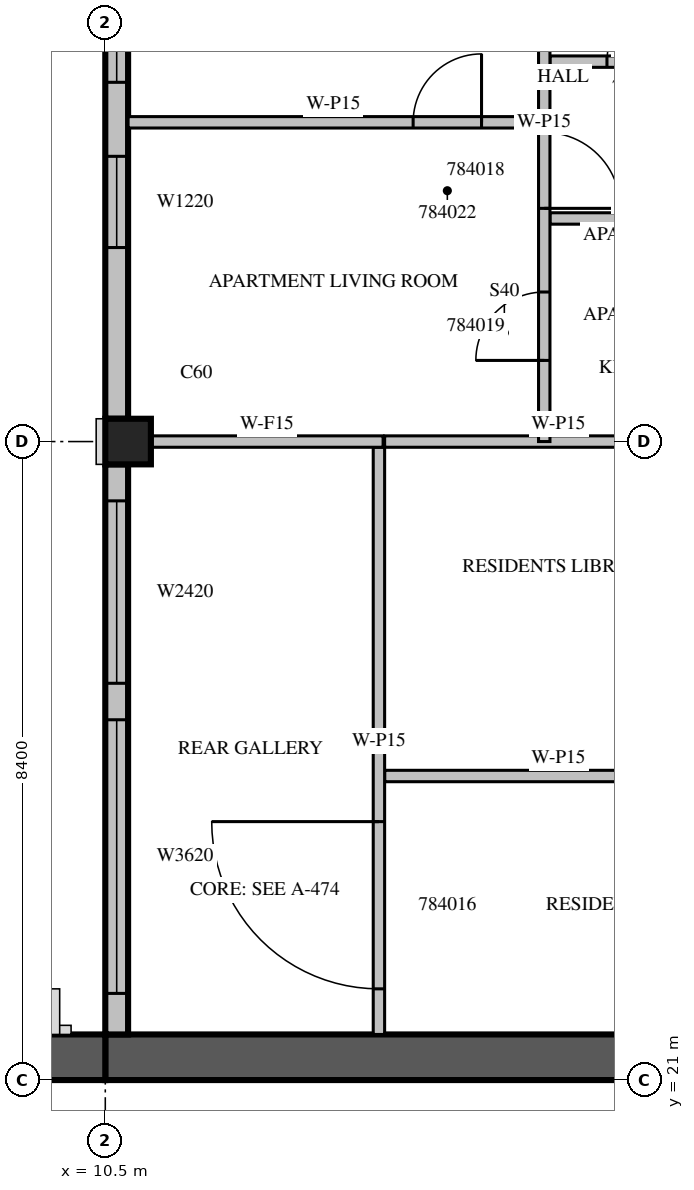
"""IFC4 building model, lengths in metres.
Left out: names, types, materials, properties, quantities, classifications, styles, units other than length and angle.
Written with IfcOpenShell. Run it as: python <this file> out.ifc"""

import sys

from ifc_helpers import new_model, si_unit, direction, frame, frame_2d, origin, origin_2d, place, context, subcontext, project, spatial, rectangle, extrude, source, transform, mapped, element, fill, save


model = new_model("IFC4")
c1 = context("Model", 3, precision=1e-05, world=origin(), true_north=direction((0.0, 1.0)))
c2 = subcontext(c1, "Body", "Model", "MODEL_VIEW")
j1 = project(units=[si_unit("LENGTHUNIT", "METRE"), si_unit("PLANEANGLEUNIT", "RADIAN")], contexts=[c1])
p1 = place(None, origin())
s1 = spatial("IfcSite", under=j1, at=p1, CompositionType="ELEMENT")
p2 = place(p1, origin())
s2 = spatial("IfcBuilding", under=s1, at=p2, CompositionType="ELEMENT")
p3 = place(p2, frame((0.0, 0.0, 354.5)))
s3 = spatial("IfcBuildingStorey", under=s2, at=p3, CompositionType="ELEMENT", Elevation=354.5)
m1 = source(origin(), c2, "Body", "SweptSolid", [
    extrude(rectangle(XDim=0.6, YDim=0.6, at=origin_2d()), origin(), (0.0, 0.0, 1.0), 3.5),
])
p4 = place(p3, frame((10.8, 29.4, 0.0), z_axis=(0.0, 0.0, 1.0), x_axis=(1.0, 0.0, 0.0)))
e1 = element("IfcColumn", 1, at=p4, inside=s3, PredefinedType="COLUMN", context=c2, shape_type="MappedRepresentation", body=[
    mapped(m1, transform((0.0, 0.0, 0.0), scale=1.0)),
])
m2 = source(origin(), c2, "Body", "SweptSolid", [
    extrude(rectangle(XDim=11.1, YDim=0.6, at=frame_2d((5.55, 0.0))), origin(), (0.0, 0.0, 1.0), 3.5),
])
p5 = place(p3, frame((10.5, 21.3, 0.0), z_axis=(0.0, 0.0, 1.0), x_axis=(1.0, 0.0, 0.0)))
e2 = element("IfcWall", 2, at=p5, inside=s3, PredefinedType="SHEAR", context=c2, shape_type="MappedRepresentation", body=[
    mapped(m2, transform((0.0, 0.0, 0.0), scale=1.0)),
])
m3 = source(origin(), c2, "Body", "SweptSolid", [
    extrude(rectangle(XDim=1.2, YDim=2.1, at=frame_2d((0.6, 1.05))), frame((0.0, 0.31, 0.0), z_axis=(0.0, -1.0, 0.0), x_axis=(1.0, 0.0, 0.0)), (0.0, 0.0, 1.0), 0.62),
])
p6 = place(p5, frame((8.7, 0.0, 0.0)))
e3 = element("IfcOpeningElement", 3, at=p6, cuts=e2, PredefinedType="OPENING", context=c2, shape_type="MappedRepresentation", body=[
    mapped(m3, transform((0.0, 0.0, 0.0), scale=1.0)),
])
m4 = source(origin(), c2, "Body", "SweptSolid", [
    extrude(rectangle(XDim=6.6, YDim=0.6, at=frame_2d((3.3, 0.0))), origin(), (0.0, 0.0, 1.0), 3.5),
])
p7 = place(p3, frame((3.9, 21.3, 0.0), z_axis=(0.0, 0.0, 1.0), x_axis=(1.0, 0.0, 0.0)))
e4 = element("IfcWall", 4, at=p7, inside=s3, PredefinedType="SHEAR", context=c2, shape_type="MappedRepresentation", body=[
    mapped(m4, transform((0.0, 0.0, 0.0), scale=1.0)),
])
m5 = source(origin(), c2, "Body", "SweptSolid", [
    extrude(rectangle(XDim=1.2, YDim=2.4, at=frame_2d((0.6, 1.2))), frame((0.0, 0.31, 0.0), z_axis=(0.0, -1.0, 0.0), x_axis=(1.0, 0.0, 0.0)), (0.0, 0.0, 1.0), 0.62),
])
p8 = place(p7, frame((1.5, 0.0, 0.6)))
e5 = element("IfcOpeningElement", 5, at=p8, cuts=e4, PredefinedType="OPENING", context=c2, shape_type="MappedRepresentation", body=[
    mapped(m5, transform((0.0, 0.0, 0.0), scale=1.0)),
])
p9 = place(p7, frame((3.6, 0.0, 0.6)))
e6 = element("IfcOpeningElement", 6, at=p9, cuts=e4, PredefinedType="OPENING", context=c2, shape_type="MappedRepresentation", body=[
    mapped(m5, transform((0.0, 0.0, 0.0), scale=1.0)),
])
m6 = source(origin(), c2, "Body", "SweptSolid", [
    extrude(rectangle(XDim=7.8, YDim=0.3, at=frame_2d((3.9, 0.0))), origin(), (0.0, 0.0, 1.0), 3.1),
])
p10 = place(p3, frame((10.65, 37.5, 0.0), z_axis=(0.0, 0.0, 1.0), x_axis=(0.0, -1.0, 0.0)))
e7 = element("IfcWall", 7, at=p10, inside=s3, PredefinedType="STANDARD", context=c2, shape_type="MappedRepresentation", body=[
    mapped(m6, transform((0.0, 0.0, 0.0), scale=1.0)),
])
m7 = source(origin(), c2, "Body", "SweptSolid", [
    extrude(rectangle(XDim=1.2, YDim=2.0, at=frame_2d((0.6, 1.0))), frame((0.0, 0.16, 0.0), z_axis=(0.0, -1.0, 0.0), x_axis=(1.0, 0.0, 0.0)), (0.0, 0.0, 1.0), 0.32),
])
p11 = place(p10, frame((4.348, 0.0, 0.6)))
e8 = element("IfcOpeningElement", 8, at=p11, cuts=e7, PredefinedType="OPENING", context=c2, shape_type="MappedRepresentation", body=[
    mapped(m7, transform((0.0, 0.0, 0.0), scale=1.0)),
])
m8 = source(origin(), c2, "Body", "SweptSolid", [
    extrude(rectangle(XDim=2.4, YDim=2.0, at=frame_2d((1.2, 1.0))), frame((0.0, 0.16, 0.0), z_axis=(0.0, -1.0, 0.0), x_axis=(1.0, 0.0, 0.0)), (0.0, 0.0, 1.0), 0.32),
])
p12 = place(p10, frame((0.974, 0.0, 0.6)))
e9 = element("IfcOpeningElement", 9, at=p12, cuts=e7, PredefinedType="OPENING", context=c2, shape_type="MappedRepresentation", body=[
    mapped(m8, transform((0.0, 0.0, 0.0), scale=1.0)),
])
m9 = source(origin(), c2, "Body", "SweptSolid", [
    extrude(rectangle(XDim=7.5, YDim=0.3, at=frame_2d((3.75, 0.0))), origin(), (0.0, 0.0, 1.0), 3.1),
])
p13 = place(p3, frame((10.65, 29.1, 0.0), z_axis=(0.0, 0.0, 1.0), x_axis=(0.0, -1.0, 0.0)))
e10 = element("IfcWall", 10, at=p13, inside=s3, PredefinedType="STANDARD", context=c2, shape_type="MappedRepresentation", body=[
    mapped(m9, transform((0.0, 0.0, 0.0), scale=1.0)),
])
m10 = source(origin(), c2, "Body", "SweptSolid", [
    extrude(rectangle(XDim=3.6, YDim=2.0, at=frame_2d((1.8, 1.0))), frame((0.0, 0.16, 0.0), z_axis=(0.0, -1.0, 0.0), x_axis=(1.0, 0.0, 0.0)), (0.0, 0.0, 1.0), 0.32),
])
p14 = place(p13, frame((3.36, 0.0, 0.6)))
e11 = element("IfcOpeningElement", 11, at=p14, cuts=e10, PredefinedType="OPENING", context=c2, shape_type="MappedRepresentation", body=[
    mapped(m10, transform((0.0, 0.0, 0.0), scale=1.0)),
])
p15 = place(p13, frame((0.48, 0.0, 0.6)))
e12 = element("IfcOpeningElement", 12, at=p15, cuts=e10, PredefinedType="OPENING", context=c2, shape_type="MappedRepresentation", body=[
    mapped(m8, transform((0.0, 0.0, 0.0), scale=1.0)),
])
m11 = source(origin(), c2, "Body", "SweptSolid", [
    extrude(rectangle(XDim=4.575, YDim=0.15, at=frame_2d((2.288, 0.0))), origin(), (0.0, 0.0, 1.0), 3.1),
])
for number, where, z_axis, x_axis in (
    (13, (14.175, 25.0, 0.0), (0.0, 0.0, 1.0), (1.0, 0.0, 0.0)),
    (14, (18.75, 29.4, 0.0), (0.0, 0.0, 1.0), (-1.0, 0.0, 0.0)),
):
    element("IfcWall", number, at=place(p3, frame(where, z_axis=z_axis, x_axis=x_axis)), inside=s3, PredefinedType="PARTITIONING", context=c2, shape_type="MappedRepresentation", body=[
        mapped(m11, transform((0.0, 0.0, 0.0), scale=1.0)),
    ])
m12 = source(origin(), c2, "Body", "SweptSolid", [
    extrude(rectangle(XDim=7.725, YDim=0.15, at=frame_2d((3.862, 0.0))), origin(), (0.0, 0.0, 1.0), 3.1),
])
p16 = place(p3, frame((14.1, 29.325, 0.0), z_axis=(0.0, 0.0, 1.0), x_axis=(0.0, -1.0, 0.0)))
e15 = element("IfcWall", 15, at=p16, inside=s3, PredefinedType="PARTITIONING", context=c2, shape_type="MappedRepresentation", body=[
    mapped(m12, transform((0.0, 0.0, 0.0), scale=1.0)),
])
m13 = source(origin(), c2, "Body", "SweptSolid", [
    extrude(rectangle(XDim=2.2, YDim=2.1, at=frame_2d((1.1, 1.05))), frame((0.0, 0.085, 0.0), z_axis=(0.0, -1.0, 0.0), x_axis=(1.0, 0.0, 0.0)), (0.0, 0.0, 1.0), 0.17),
])
p17 = place(p16, frame((4.925, 0.0, 0.0)))
e16 = element("IfcOpeningElement", 16, at=p17, cuts=e15, PredefinedType="OPENING", context=c2, shape_type="MappedRepresentation", body=[
    mapped(m13, transform((0.0, 0.0, 0.0), scale=1.0)),
])
m14 = source(origin(), c2, "Body", "SweptSolid", [
    extrude(rectangle(XDim=5.4, YDim=0.15, at=frame_2d((2.7, 0.0))), origin(), (0.0, 0.0, 1.0), 3.1),
])
p18 = place(p3, frame((16.2, 33.6, 0.0), z_axis=(0.0, 0.0, 1.0), x_axis=(-1.0, 0.0, 0.0)))
e17 = element("IfcWall", 17, at=p18, inside=s3, PredefinedType="PARTITIONING", context=c2, shape_type="MappedRepresentation", body=[
    mapped(m14, transform((0.0, 0.0, 0.0), scale=1.0)),
])
m15 = source(origin(), c2, "Body", "SweptSolid", [
    extrude(rectangle(XDim=0.9, YDim=2.1, at=frame_2d((0.45, 1.05))), frame((0.0, 0.085, 0.0), z_axis=(0.0, -1.0, 0.0), x_axis=(1.0, 0.0, 0.0)), (0.0, 0.0, 1.0), 0.17),
])
p19 = place(p18, frame((0.75, 0.0, 0.0)))
e18 = element("IfcOpeningElement", 18, at=p19, cuts=e17, PredefinedType="OPENING", context=c2, shape_type="MappedRepresentation", body=[
    mapped(m15, transform((0.0, 0.0, 0.0), scale=1.0)),
])
m16 = source(origin(), c2, "Body", "SweptSolid", [
    extrude(rectangle(XDim=2.4, YDim=0.15, at=frame_2d((1.2, 0.0))), origin(), (0.0, 0.0, 1.0), 3.1),
])
p20 = place(p3, frame((18.75, 32.335, 0.0), z_axis=(0.0, 0.0, 1.0), x_axis=(-1.0, 0.0, 0.0)))
e19 = element("IfcWall", 19, at=p20, inside=s3, PredefinedType="PARTITIONING", context=c2, shape_type="MappedRepresentation", body=[
    mapped(m16, transform((0.0, 0.0, 0.0), scale=1.0)),
])
p21 = place(p3, frame((18.75, 34.398, 0.0), z_axis=(0.0, 0.0, 1.0), x_axis=(-1.0, 0.0, 0.0)))
e20 = element("IfcWall", 20, at=p21, inside=s3, PredefinedType="PARTITIONING", context=c2, shape_type="MappedRepresentation", body=[
    mapped(m16, transform((0.0, 0.0, 0.0), scale=1.0)),
])
p22 = place(p21, frame((0.75, 0.0, 0.0)))
e21 = element("IfcOpeningElement", 21, at=p22, cuts=e20, PredefinedType="OPENING", context=c2, shape_type="MappedRepresentation", body=[
    mapped(m15, transform((0.0, 0.0, 0.0), scale=1.0)),
])
m17 = source(origin(), c2, "Body", "SweptSolid", [
    extrude(rectangle(XDim=3.056, YDim=0.15, at=frame_2d((1.528, 0.0))), origin(), (0.0, 0.0, 1.0), 3.1),
])
p23 = place(p3, frame((14.155, 29.4, 0.0), z_axis=(0.0, 0.0, 1.0), x_axis=(-1.0, 0.0, 0.0)))
e22 = element("IfcWall", 22, at=p23, inside=s3, PredefinedType="PARTITIONING", context=c2, shape_type="MappedRepresentation", body=[
    mapped(m17, transform((0.0, 0.0, 0.0), scale=1.0)),
])
m18 = source(origin(), c2, "Body", "SweptSolid", [
    extrude(rectangle(XDim=8.4, YDim=0.15, at=frame_2d((4.2, 0.0))), origin(), (0.0, 0.0, 1.0), 3.1),
])
p24 = place(p3, frame((16.275, 29.4, 0.0), z_axis=(0.0, 0.0, 1.0), x_axis=(0.0, 1.0, 0.0)))
e23 = element("IfcWall", 23, at=p24, inside=s3, PredefinedType="PARTITIONING", context=c2, shape_type="MappedRepresentation", body=[
    mapped(m18, transform((0.0, 0.0, 0.0), scale=1.0)),
])
m19 = source(origin(), c2, "Body", "SweptSolid", [
    extrude(rectangle(XDim=1.0, YDim=2.1, at=frame_2d((0.5, 1.05))), frame((0.0, 0.085, 0.0), z_axis=(0.0, -1.0, 0.0), x_axis=(1.0, 0.0, 0.0)), (0.0, 0.0, 1.0), 0.17),
])
p25 = place(p24, frame((3.068, 0.0, 0.0)))
e24 = element("IfcOpeningElement", 24, at=p25, cuts=e23, PredefinedType="OPENING", context=c2, shape_type="MappedRepresentation", body=[
    mapped(m19, transform((0.0, 0.0, 0.0), scale=1.0)),
])
p26 = place(p24, frame((1.067, 0.0, 0.0)))
e25 = element("IfcOpeningElement", 25, at=p26, cuts=e23, PredefinedType="OPENING", context=c2, shape_type="MappedRepresentation", body=[
    mapped(m15, transform((0.0, 0.0, 0.0), scale=1.0)),
])
p27 = place(p24, frame((7.252, 0.0, 0.0)))
e26 = element("IfcOpeningElement", 26, at=p27, cuts=e23, PredefinedType="OPENING", context=c2, shape_type="MappedRepresentation", body=[
    mapped(m15, transform((0.0, 0.0, 0.0), scale=1.0)),
])
m20 = source(origin(), c2, "Body", "SweptSolid", [
    extrude(rectangle(XDim=1.2, YDim=2.0, at=frame_2d((0.6, 1.0))), frame((0.0, 0.03, 0.0), z_axis=(0.0, -1.0, 0.0), x_axis=(1.0, 0.0, 0.0)), (0.0, 0.0, 1.0), 0.06),
])
p28 = place(p11, origin())
e27 = element("IfcWindow", 27, at=p28, inside=s3, PartitioningType="SINGLE_PANEL", PredefinedType="WINDOW", context=c2, shape_type="MappedRepresentation", body=[
    mapped(m20, transform((0.0, 0.0, 0.0), scale=1.0)),
])
fill(e8, e27)
m21 = source(origin(), c2, "Body", "SweptSolid", [
    extrude(rectangle(XDim=3.6, YDim=2.0, at=frame_2d((1.8, 1.0))), frame((0.0, 0.03, 0.0), z_axis=(0.0, -1.0, 0.0), x_axis=(1.0, 0.0, 0.0)), (0.0, 0.0, 1.0), 0.06),
])
p29 = place(p14, origin())
e28 = element("IfcWindow", 28, at=p29, inside=s3, PartitioningType="SINGLE_PANEL", PredefinedType="WINDOW", context=c2, shape_type="MappedRepresentation", body=[
    mapped(m21, transform((0.0, 0.0, 0.0), scale=1.0)),
])
fill(e11, e28)
m22 = source(origin(), c2, "Body", "SweptSolid", [
    extrude(rectangle(XDim=2.4, YDim=2.0, at=frame_2d((1.2, 1.0))), frame((0.0, 0.03, 0.0), z_axis=(0.0, -1.0, 0.0), x_axis=(1.0, 0.0, 0.0)), (0.0, 0.0, 1.0), 0.06),
])
p30 = place(p12, origin())
e29 = element("IfcWindow", 29, at=p30, inside=s3, PartitioningType="SINGLE_PANEL", PredefinedType="WINDOW", context=c2, shape_type="MappedRepresentation", body=[
    mapped(m22, transform((0.0, 0.0, 0.0), scale=1.0)),
])
fill(e9, e29)
p31 = place(p15, origin())
e30 = element("IfcWindow", 30, at=p31, inside=s3, PartitioningType="SINGLE_PANEL", PredefinedType="WINDOW", context=c2, shape_type="MappedRepresentation", body=[
    mapped(m22, transform((0.0, 0.0, 0.0), scale=1.0)),
])
fill(e12, e30)
m23 = source(origin(), c2, "Body", "SweptSolid", [
    extrude(rectangle(XDim=2.2, YDim=2.1, at=frame_2d((1.1, 1.05))), frame((0.0, 0.025, 0.0), z_axis=(0.0, -1.0, 0.0), x_axis=(1.0, 0.0, 0.0)), (0.0, 0.0, 1.0), 0.05),
])
p32 = place(p17, origin())
e31 = element("IfcDoor", 31, at=p32, inside=s3, OperationType="DOUBLE_DOOR_SINGLE_SWING", PredefinedType="DOOR", context=c2, shape_type="MappedRepresentation", body=[
    mapped(m23, transform((0.0, 0.0, 0.0), scale=1.0)),
])
fill(e16, e31)
m24 = source(origin(), c2, "Body", "SweptSolid", [
    extrude(rectangle(XDim=1.0, YDim=2.1, at=frame_2d((0.5, 1.05))), frame((0.0, 0.025, 0.0), z_axis=(0.0, -1.0, 0.0), x_axis=(1.0, 0.0, 0.0)), (0.0, 0.0, 1.0), 0.05),
])
p33 = place(p25, origin())
e32 = element("IfcDoor", 32, at=p33, inside=s3, OperationType="SINGLE_SWING_RIGHT", PredefinedType="DOOR", context=c2, shape_type="MappedRepresentation", body=[
    mapped(m24, transform((0.0, 0.0, 0.0), scale=1.0)),
])
fill(e24, e32)
m25 = source(origin(), c2, "Body", "SweptSolid", [
    extrude(rectangle(XDim=0.9, YDim=2.1, at=frame_2d((0.45, 1.05))), frame((0.0, 0.025, 0.0), z_axis=(0.0, -1.0, 0.0), x_axis=(1.0, 0.0, 0.0)), (0.0, 0.0, 1.0), 0.05),
])
p34 = place(p26, origin())
e33 = element("IfcDoor", 33, at=p34, inside=s3, OperationType="SINGLE_SWING_LEFT", PredefinedType="DOOR", context=c2, shape_type="MappedRepresentation", body=[
    mapped(m25, transform((0.0, 0.0, 0.0), scale=1.0)),
])
fill(e25, e33)
p35 = place(p22, origin())
e34 = element("IfcDoor", 34, at=p35, inside=s3, OperationType="SINGLE_SWING_RIGHT", PredefinedType="DOOR", context=c2, shape_type="MappedRepresentation", body=[
    mapped(m25, transform((0.0, 0.0, 0.0), scale=1.0)),
])
fill(e21, e34)
p36 = place(p19, origin())
e35 = element("IfcDoor", 35, at=p36, inside=s3, OperationType="SINGLE_SWING_RIGHT", PredefinedType="DOOR", context=c2, shape_type="MappedRepresentation", body=[
    mapped(m25, transform((0.0, 0.0, 0.0), scale=1.0)),
])
fill(e18, e35)
save(model, sys.argv[1])
